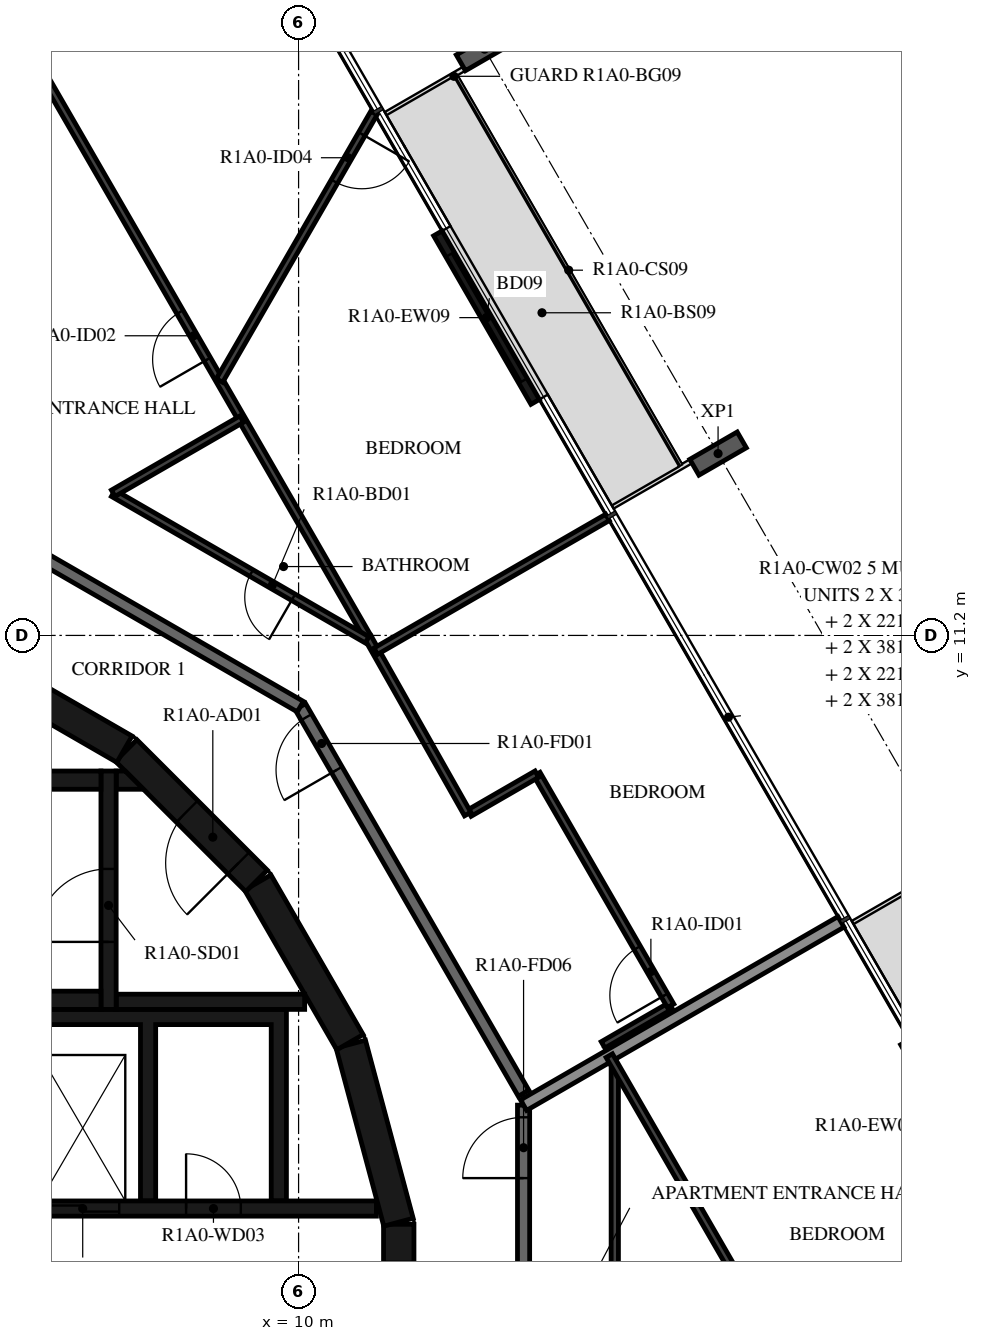
"""IFC4 building model, lengths in metres.
Left out: names, types, materials, properties, quantities, classifications, styles, units other than length and angle.
Written with IfcOpenShell. Run it as: python <this file> out.ifc"""

import sys

from ifc_helpers import new_model, si_unit, direction, frame, frame_2d, origin, origin_2d, place, context, subcontext, project, spatial, polyline, rectangle, i_section, outline, extrude, element, fill, save


model = new_model("IFC4")
c1 = context("Model", 3, precision=1e-05, world=origin(), true_north=direction((0.0, 1.0)))
c2 = subcontext(c1, "Body", "Model", "MODEL_VIEW")
j1 = project(units=[si_unit("LENGTHUNIT", "METRE"), si_unit("PLANEANGLEUNIT", "RADIAN")], contexts=[c1])
p1 = place(None, origin())
s1 = spatial("IfcSite", under=j1, at=p1, CompositionType="ELEMENT")
p2 = place(p1, origin())
s2 = spatial("IfcBuilding", under=s1, at=p2, CompositionType="ELEMENT")
p3 = place(p2, frame((0.0, 0.0, 45.4)))
s3 = spatial("IfcBuildingStorey", under=s2, at=p3, CompositionType="ELEMENT", Elevation=45.4)
for number, where, z_axis, x_axis in (
    (1, (16.899, 14.19, -0.38), (0.0, 0.0, 1.0), (0.5, -0.866, 0.0)),
    (2, (13.059, 20.842, -0.38), (0.0, 0.0, 1.0), (0.5, -0.866, 0.0)),
):
    element("IfcColumn", number, at=place(p3, frame(where, z_axis=z_axis, x_axis=x_axis)), inside=s3, PredefinedType="COLUMN", context=c2, shape_type="SweptSolid", body=[
        extrude(i_section(OverallWidth=0.3, OverallDepth=0.9, WebThickness=0.019, FlangeThickness=0.035, FilletRadius=0.03, at=origin_2d()), origin(), (0.0, 0.0, 1.0), 3.5),
    ])
p4 = place(p3, frame((21.571, 1.738, 0.0), z_axis=(0.0, 0.0, 1.0), x_axis=(-0.500028443584, 0.866008981251, 0.0)))
e3 = element("IfcWall", 3, at=p4, inside=s3, PredefinedType="STANDARD", context=c2, shape_type="SweptSolid", body=[
    extrude(rectangle(XDim=3.2, YDim=0.16, at=frame_2d((1.6, 0.0))), origin(), (0.0, 0.0, 1.0), 3.12),
])
p5 = place(p4, frame((0.4, 0.0, 0.0)))
e4 = element("IfcOpeningElement", 4, at=p5, cuts=e3, PredefinedType="OPENING", context=c2, shape_type="SweptSolid", body=[
    extrude(rectangle(XDim=2.4, YDim=2.4, at=frame_2d((1.2, 1.2))), frame((0.0, 0.09, 0.0), z_axis=(0.0, -1.0, 0.0), x_axis=(1.0, 0.0, 0.0)), (0.0, 0.0, 1.0), 0.18),
])
p6 = place(p3, frame((13.891, 15.041, 0.0), z_axis=(0.0, 0.0, 1.0), x_axis=(-0.499971222258, 0.866042017984, 0.0)))
e5 = element("IfcWall", 5, at=p6, inside=s3, PredefinedType="STANDARD", context=c2, shape_type="SweptSolid", body=[
    extrude(rectangle(XDim=3.2, YDim=0.16, at=frame_2d((1.6, 0.0))), origin(), (0.0, 0.0, 1.0), 3.12),
])
p7 = place(p6, frame((0.4, 0.0, 0.0)))
e6 = element("IfcOpeningElement", 6, at=p7, cuts=e5, PredefinedType="OPENING", context=c2, shape_type="SweptSolid", body=[
    extrude(rectangle(XDim=2.4, YDim=2.4, at=frame_2d((1.2, 1.2))), frame((0.0, 0.09, 0.0), z_axis=(0.0, -1.0, 0.0), x_axis=(1.0, 0.0, 0.0)), (0.0, 0.0, 1.0), 0.18),
])
p8 = place(p3, frame((11.647, -1.516, 0.0), z_axis=(0.0, 0.0, 1.0), x_axis=(0.0, 1.0, 0.0)))
e7 = element("IfcWall", 7, at=p8, inside=s3, PredefinedType="SHEAR", context=c2, shape_type="SweptSolid", body=[
    extrude(rectangle(XDim=3.033, YDim=0.5, at=frame_2d((1.516, 0.0))), origin(), (0.0, 0.0, 1.0), 3.12),
])
p9 = place(p8, frame((0.616, 0.0, 0.0)))
e8 = element("IfcOpeningElement", 8, at=p9, cuts=e7, PredefinedType="OPENING", context=c2, shape_type="SweptSolid", body=[
    extrude(rectangle(XDim=1.8, YDim=2.1, at=frame_2d((0.9, 1.05))), frame((0.0, 0.26, 0.0), z_axis=(0.0, -1.0, 0.0), x_axis=(1.0, 0.0, 0.0)), (0.0, 0.0, 1.0), 0.52),
])
for number, where, z_axis, x_axis in (
    (9, (11.643, 1.55, 0.0), (0.0, 0.0, 1.0), (-0.259, 0.966, 0.0)),
    (10, (10.845, 4.51, 0.0), (0.0, 0.0, 1.0), (-0.5, 0.866, 0.0)),
):
    element("IfcWall", number, at=place(p3, frame(where, z_axis=z_axis, x_axis=x_axis)), inside=s3, PredefinedType="SHEAR", context=c2, shape_type="SweptSolid", body=[
        extrude(rectangle(XDim=3.033, YDim=0.5, at=frame_2d((1.516, 0.0))), origin(), (0.0, 0.0, 1.0), 3.12),
    ])
p10 = place(p3, frame((9.308, 7.164, 0.0), z_axis=(0.0, 0.0, 1.0), x_axis=(-0.707106781187, 0.707106781187, 0.0)))
e11 = element("IfcWall", 11, at=p10, inside=s3, PredefinedType="SHEAR", context=c2, shape_type="SweptSolid", body=[
    extrude(rectangle(XDim=3.032, YDim=0.5, at=frame_2d((1.516, 0.0))), origin(), (0.0, 0.0, 1.0), 3.12),
])
p11 = place(p10, frame((0.416, 0.0, 0.0)))
e12 = element("IfcOpeningElement", 12, at=p11, cuts=e11, PredefinedType="OPENING", context=c2, shape_type="SweptSolid", body=[
    extrude(rectangle(XDim=1.2, YDim=2.1, at=frame_2d((0.6, 1.05))), frame((0.0, 0.26, 0.0), z_axis=(0.0, -1.0, 0.0), x_axis=(1.0, 0.0, 0.0)), (0.0, 0.0, 1.0), 0.52),
])
p12 = place(p3, frame((7.137, 9.329, 0.0), z_axis=(0.0, 0.0, 1.0), x_axis=(-0.865975092491, 0.500087131594, 0.0)))
e13 = element("IfcWall", 13, at=p12, inside=s3, PredefinedType="SHEAR", context=c2, shape_type="SweptSolid", body=[
    extrude(rectangle(XDim=3.033, YDim=0.5, at=frame_2d((1.516, 0.0))), origin(), (0.0, 0.0, 1.0), 3.12),
])
for number, where, z_axis, x_axis in (
    (14, (0.0, 5.2, 0.0), (0.0, 0.0, 1.0), (1.0, 0.0, 0.0)),
    (15, (0.0, 8.82, 0.0), (0.0, 0.0, 1.0), (1.0, 0.0, 0.0)),
):
    element("IfcWall", number, at=place(p3, frame(where, z_axis=z_axis, x_axis=x_axis)), inside=s3, PredefinedType="SHEAR", context=c2, shape_type="SweptSolid", body=[
        extrude(rectangle(XDim=6.75, YDim=0.3, at=frame_2d((3.375, 0.0))), origin(), (0.0, 0.0, 1.0), 3.12),
    ])
p13 = place(p3, frame((6.875, 5.05, 0.0), z_axis=(0.0, 0.0, 1.0), x_axis=(0.0, 1.0, 0.0)))
e16 = element("IfcWall", 16, at=p13, inside=s3, PredefinedType="SHEAR", context=c2, shape_type="SweptSolid", body=[
    extrude(rectangle(XDim=3.92, YDim=0.25, at=frame_2d((1.96, 0.0))), origin(), (0.0, 0.0, 1.0), 3.12),
])
p14 = place(p13, frame((1.11, 0.0, 0.0)))
e17 = element("IfcOpeningElement", 17, at=p14, cuts=e16, PredefinedType="OPENING", context=c2, shape_type="SweptSolid", body=[
    extrude(rectangle(XDim=1.2, YDim=2.1, at=frame_2d((0.6, 1.05))), frame((0.0, 0.135, 0.0), z_axis=(0.0, -1.0, 0.0), x_axis=(1.0, 0.0, 0.0)), (0.0, 0.0, 1.0), 0.27),
])
p15 = place(p3, frame((7.0, 5.175, 0.0), z_axis=(0.0, 0.0, 1.0), x_axis=(1.0, 0.0, 0.0)))
e18 = element("IfcWall", 18, at=p15, inside=s3, PredefinedType="SHEAR", context=c2, shape_type="SweptSolid", body=[
    extrude(rectangle(XDim=3.1, YDim=0.25, at=frame_2d((1.55, 0.0))), origin(), (0.0, 0.0, 1.0), 3.12),
])
p16 = place(p3, origin())
e19 = element("IfcWall", 19, at=p16, inside=s3, PredefinedType="SHEAR", context=c2, shape_type="SweptSolid", body=[
    extrude(outline(polyline([(7.448, 8.67), (7.0, 8.67), (7.0, 8.97), (7.148, 8.97), (7.448, 8.67)])), origin(), (0.0, 0.0, 1.0), 3.12),
])
p17 = place(p3, origin())
e20 = element("IfcWall", 20, at=p17, inside=s3, PredefinedType="SHEAR", context=c2, shape_type="SweptSolid", body=[
    extrude(outline(polyline([(-9.55, 4.8), (-7.65, 4.8), (-7.65, 1.9), (-7.4, 1.9), (-7.4, 4.8), (-5.5, 4.8), (-5.5, 1.9), (-5.25, 1.9), (-5.25, 4.8), (-3.35, 4.8), (-3.35, 1.9), (-3.1, 1.9), (-3.1, 4.8), (-1.2, 4.8), (-1.2, 1.9), (-0.95, 1.9), (-0.95, 4.8), (0.95, 4.8), (0.95, 1.9), (1.2, 1.9), (1.2, 4.8), (3.1, 4.8), (3.1, 1.9), (3.35, 1.9), (3.35, 4.8), (5.25, 4.8), (5.25, 1.9), (5.5, 1.9), (5.5, 4.8), (7.4, 4.8), (7.4, 1.9), (7.65, 1.9), (7.65, 4.8), (9.55, 4.8), (9.55, 1.9), (9.8, 1.9), (9.8, 4.8), (9.8, 5.05), (-9.8, 5.05), (-9.8, 4.8), (-9.8, 1.9), (-9.55, 1.9), (-9.55, 4.8)])), origin(), (0.0, 0.0, 1.0), 3.12),
])
p18 = place(p3, frame((3.35, 1.775, 0.0), z_axis=(0.0, 0.0, 1.0), x_axis=(1.0, 0.0, 0.0)))
e21 = element("IfcWall", 21, at=p18, inside=s3, PredefinedType="SHEAR", context=c2, shape_type="SweptSolid", body=[
    extrude(rectangle(XDim=7.93, YDim=0.25, at=frame_2d((3.965, 0.0))), origin(), (0.0, 0.0, 1.0), 3.12),
])
p19 = place(p18, frame((0.35, 0.0, 0.0)))
e22 = element("IfcOpeningElement", 22, at=p19, cuts=e21, PredefinedType="OPENING", context=c2, shape_type="SweptSolid", body=[
    extrude(rectangle(XDim=1.2, YDim=2.4, at=frame_2d((0.6, 1.2))), frame((0.0, 0.135, 0.0), z_axis=(0.0, -1.0, 0.0), x_axis=(1.0, 0.0, 0.0)), (0.0, 0.0, 1.0), 0.27),
])
p20 = place(p18, frame((2.5, 0.0, 0.0)))
e23 = element("IfcOpeningElement", 23, at=p20, cuts=e21, PredefinedType="OPENING", context=c2, shape_type="SweptSolid", body=[
    extrude(rectangle(XDim=1.2, YDim=2.4, at=frame_2d((0.6, 1.2))), frame((0.0, 0.135, 0.0), z_axis=(0.0, -1.0, 0.0), x_axis=(1.0, 0.0, 0.0)), (0.0, 0.0, 1.0), 0.27),
])
p21 = place(p18, frame((4.8, 0.0, 0.0)))
e24 = element("IfcOpeningElement", 24, at=p21, cuts=e21, PredefinedType="OPENING", context=c2, shape_type="SweptSolid", body=[
    extrude(rectangle(XDim=0.9, YDim=2.1, at=frame_2d((0.45, 1.05))), frame((0.0, 0.135, 0.0), z_axis=(0.0, -1.0, 0.0), x_axis=(1.0, 0.0, 0.0)), (0.0, 0.0, 1.0), 0.27),
])
p22 = place(p3, frame((13.7, 3.671, 0.0), z_axis=(0.0, 0.0, 1.0), x_axis=(-0.500001669485, 0.866024439905, 0.0)))
e25 = element("IfcWall", 25, at=p22, inside=s3, PredefinedType="STANDARD", context=c2, shape_type="SweptSolid", body=[
    extrude(rectangle(XDim=7.342, YDim=0.2, at=frame_2d((3.671, 0.0))), origin(), (0.0, 0.0, 1.0), 3.12),
])
p23 = place(p22, frame((6.142, 0.0, 0.0)))
e26 = element("IfcOpeningElement", 26, at=p23, cuts=e25, PredefinedType="OPENING", context=c2, shape_type="SweptSolid", body=[
    extrude(rectangle(XDim=1.0, YDim=2.1, at=frame_2d((0.5, 1.05))), frame((0.0, 0.11, 0.0), z_axis=(0.0, -1.0, 0.0), x_axis=(1.0, 0.0, 0.0)), (0.0, 0.0, 1.0), 0.22),
])
p24 = place(p3, frame((10.029, 10.029, 0.0), z_axis=(0.0, 0.0, 1.0), x_axis=(-0.866024439905, 0.500001669485, 0.0)))
e27 = element("IfcWall", 27, at=p24, inside=s3, PredefinedType="STANDARD", context=c2, shape_type="SweptSolid", body=[
    extrude(rectangle(XDim=7.342, YDim=0.2, at=frame_2d((3.671, 0.0))), origin(), (0.0, 0.0, 1.0), 3.12),
])
p25 = place(p3, frame((13.7, -3.671, 0.0), z_axis=(0.0, 0.0, 1.0), x_axis=(0.0, 1.0, 0.0)))
e28 = element("IfcWall", 28, at=p25, inside=s3, PredefinedType="STANDARD", context=c2, shape_type="SweptSolid", body=[
    extrude(rectangle(XDim=7.146, YDim=0.2, at=frame_2d((3.573, 0.0))), origin(), (0.0, 0.0, 1.0), 3.12),
])
p26 = place(p25, frame((5.947, 0.0, 0.0)))
e29 = element("IfcOpeningElement", 29, at=p26, cuts=e28, PredefinedType="OPENING", context=c2, shape_type="SweptSolid", body=[
    extrude(rectangle(XDim=1.0, YDim=2.1, at=frame_2d((0.5, 1.05))), frame((0.0, 0.11, 0.0), z_axis=(0.0, -1.0, 0.0), x_axis=(1.0, 0.0, 0.0)), (0.0, 0.0, 1.0), 0.22),
])
p27 = place(p3, frame((13.7, 3.476, 0.0), z_axis=(0.0, 0.0, 1.0), x_axis=(0.866013584312, 0.500020471368, 0.0)))
e30 = element("IfcWall", 30, at=p27, inside=s3, PredefinedType="STANDARD", context=c2, shape_type="SweptSolid", body=[
    extrude(rectangle(XDim=6.028, YDim=0.2, at=frame_2d((3.014, 0.0))), origin(), (0.0, 0.0, 1.0), 2.73),
])
p28 = place(p3, frame((15.007, 4.467, 0.0), z_axis=(0.0, 0.0, 1.0), x_axis=(0.86599869919, 0.500046250861, 0.0)))
e31 = element("IfcWall", 31, at=p28, inside=s3, PredefinedType="PARTITIONING", context=c2, shape_type="SweptSolid", body=[
    extrude(rectangle(XDim=1.284, YDim=0.12, at=frame_2d((0.642, 0.0))), origin(), (0.0, 0.0, 1.0), 3.12),
])
p29 = place(p3, frame((16.119, 5.109, 0.0), z_axis=(0.0, 0.0, 1.0), x_axis=(-0.499988222896, 0.866032203192, 0.0)))
e32 = element("IfcWall", 32, at=p29, inside=s3, PredefinedType="PARTITIONING", context=c2, shape_type="SweptSolid", body=[
    extrude(rectangle(XDim=4.4, YDim=0.12, at=frame_2d((2.2, 0.0))), origin(), (0.0, 0.0, 1.0), 3.12),
])
p30 = place(p29, frame((0.2, 0.0, 0.0)))
e33 = element("IfcOpeningElement", 33, at=p30, cuts=e32, PredefinedType="OPENING", context=c2, shape_type="SweptSolid", body=[
    extrude(rectangle(XDim=0.9, YDim=2.1, at=frame_2d((0.45, 1.05))), frame((0.0, 0.07, 0.0), z_axis=(0.0, -1.0, 0.0), x_axis=(1.0, 0.0, 0.0)), (0.0, 0.0, 1.0), 0.14),
])
p31 = place(p3, frame((13.919, 8.919, 0.0), z_axis=(0.0, 0.0, 1.0), x_axis=(-0.86599869919, -0.500046250861, 0.0)))
e34 = element("IfcWall", 34, at=p31, inside=s3, PredefinedType="PARTITIONING", context=c2, shape_type="SweptSolid", body=[
    extrude(rectangle(XDim=1.284, YDim=0.12, at=frame_2d((0.642, 0.0))), origin(), (0.0, 0.0, 1.0), 3.12),
])
p32 = place(p3, frame((12.781, 8.262, 0.0), z_axis=(0.0, 0.0, 1.0), x_axis=(-0.492233259633, 0.870463335305, 0.0)))
e35 = element("IfcWall", 35, at=p32, inside=s3, PredefinedType="PARTITIONING", context=c2, shape_type="SweptSolid", body=[
    extrude(rectangle(XDim=3.336, YDim=0.12, at=frame_2d((1.668, 0.0))), origin(), (0.0, 0.0, 1.0), 3.12),
])
p33 = place(p3, frame((11.139, 11.167, 0.0), z_axis=(0.0, 0.0, 1.0), x_axis=(-0.499994660107, 0.866028486751, 0.0)))
e36 = element("IfcWall", 36, at=p33, inside=s3, PredefinedType="PARTITIONING", context=c2, shape_type="SweptSolid", body=[
    extrude(rectangle(XDim=15.786, YDim=0.12, at=frame_2d((7.893, 0.0))), origin(), (0.0, 0.0, 1.0), 3.12),
])
p34 = place(p33, frame((5.279, 0.0, 0.0)))
e37 = element("IfcOpeningElement", 37, at=p34, cuts=e36, PredefinedType="OPENING", context=c2, shape_type="SweptSolid", body=[
    extrude(rectangle(XDim=0.9, YDim=2.1, at=frame_2d((0.45, 1.05))), frame((0.0, 0.07, 0.0), z_axis=(0.0, -1.0, 0.0), x_axis=(1.0, 0.0, 0.0)), (0.0, 0.0, 1.0), 0.14),
])
p35 = place(p33, frame((12.23, 0.0, 0.0)))
e38 = element("IfcOpeningElement", 38, at=p35, cuts=e36, PredefinedType="OPENING", context=c2, shape_type="SweptSolid", body=[
    extrude(rectangle(XDim=0.9, YDim=2.1, at=frame_2d((0.45, 1.05))), frame((0.0, 0.07, 0.0), z_axis=(0.0, -1.0, 0.0), x_axis=(1.0, 0.0, 0.0)), (0.0, 0.0, 1.0), 0.14),
])
p36 = place(p3, frame((11.127, 11.127, 0.0), z_axis=(0.0, 0.0, 1.0), x_axis=(-0.866043916853, 0.499967933054, 0.0)))
e39 = element("IfcWall", 39, at=p36, inside=s3, PredefinedType="PARTITIONING", context=c2, shape_type="SweptSolid", body=[
    extrude(rectangle(XDim=4.821, YDim=0.12, at=frame_2d((2.411, 0.0))), origin(), (0.0, 0.0, 1.0), 3.12),
])
p37 = place(p36, frame((1.4, 0.0, 0.0)))
e40 = element("IfcOpeningElement", 40, at=p37, cuts=e39, PredefinedType="OPENING", context=c2, shape_type="SweptSolid", body=[
    extrude(rectangle(XDim=0.8, YDim=2.1, at=frame_2d((0.4, 1.05))), frame((0.0, 0.07, 0.0), z_axis=(0.0, -1.0, 0.0), x_axis=(1.0, 0.0, 0.0)), (0.0, 0.0, 1.0), 0.14),
])
p38 = place(p3, frame((6.952, 13.538, 0.0), z_axis=(0.0, 0.0, 1.0), x_axis=(0.866030657337, 0.49999090047, 0.0)))
e41 = element("IfcWall", 41, at=p38, inside=s3, PredefinedType="PARTITIONING", context=c2, shape_type="SweptSolid", body=[
    extrude(rectangle(XDim=2.44, YDim=0.12, at=frame_2d((1.22, 0.0))), origin(), (0.0, 0.0, 1.0), 3.12),
])
p39 = place(p3, frame((15.08, 13.14, 0.0), z_axis=(0.0, 0.0, 1.0), x_axis=(-0.866032203192, -0.499988222896, 0.0)))
e42 = element("IfcWall", 42, at=p39, inside=s3, PredefinedType="PARTITIONING", context=c2, shape_type="SweptSolid", body=[
    extrude(rectangle(XDim=4.4, YDim=0.12, at=frame_2d((2.2, 0.0))), origin(), (0.0, 0.0, 1.0), 2.73),
])
p40 = place(p3, frame((11.24, 19.792, 0.0), z_axis=(0.0, 0.0, 1.0), x_axis=(-0.499978956711, -0.866037552792, 0.0)))
e43 = element("IfcWall", 43, at=p40, inside=s3, PredefinedType="PARTITIONING", context=c2, shape_type="SweptSolid", body=[
    extrude(rectangle(XDim=5.081, YDim=0.12, at=frame_2d((2.541, 0.0))), origin(), (0.0, 0.0, 1.0), 3.12),
])
p41 = place(p40, frame((0.4, 0.0, 0.0)))
e44 = element("IfcOpeningElement", 44, at=p41, cuts=e43, PredefinedType="OPENING", context=c2, shape_type="SweptSolid", body=[
    extrude(rectangle(XDim=0.9, YDim=2.1, at=frame_2d((0.45, 1.05))), frame((0.0, 0.07, 0.0), z_axis=(0.0, -1.0, 0.0), x_axis=(1.0, 0.0, 0.0)), (0.0, 0.0, 1.0), 0.14),
])
p42 = place(p3, frame((15.2, -4.073, 0.0), z_axis=(0.0, 0.0, 1.0), x_axis=(0.0, 1.0, 0.0)))
e45 = element("IfcWall", 45, at=p42, inside=s3, PredefinedType="PARTITIONING", context=c2, shape_type="SweptSolid", body=[
    extrude(rectangle(XDim=8.146, YDim=0.12, at=frame_2d((4.073, 0.0))), origin(), (0.0, 0.0, 1.0), 3.12),
])
p43 = place(p42, frame((1.357, 0.0, 0.0)))
e46 = element("IfcOpeningElement", 46, at=p43, cuts=e45, PredefinedType="OPENING", context=c2, shape_type="SweptSolid", body=[
    extrude(rectangle(XDim=0.8, YDim=2.1, at=frame_2d((0.4, 1.05))), frame((0.0, 0.07, 0.0), z_axis=(0.0, -1.0, 0.0), x_axis=(1.0, 0.0, 0.0)), (0.0, 0.0, 1.0), 0.14),
])
p44 = place(p3, frame((15.11, 4.289, 0.0), z_axis=(0.0, 0.0, 1.0), x_axis=(0.500001702147, -0.866024421047, 0.0)))
e47 = element("IfcWall", 47, at=p44, inside=s3, PredefinedType="PARTITIONING", context=c2, shape_type="SweptSolid", body=[
    extrude(rectangle(XDim=6.458, YDim=0.12, at=frame_2d((3.229, 0.0))), origin(), (0.0, 0.0, 1.0), 3.12),
])
p45 = place(p7, origin())
e48 = element("IfcDoor", 48, at=p45, inside=s3, OperationType="DOUBLE_DOOR_SLIDING", PredefinedType="DOOR", context=c2, shape_type="SweptSolid", body=[
    extrude(rectangle(XDim=2.4, YDim=2.4, at=frame_2d((1.2, 1.2))), frame((0.0, 0.025, 0.0), z_axis=(0.0, -1.0, 0.0), x_axis=(1.0, 0.0, 0.0)), (0.0, 0.0, 1.0), 0.05),
])
fill(e6, e48)
p46 = place(p14, origin())
e49 = element("IfcDoor", 49, at=p46, inside=s3, OperationType="SINGLE_SWING_LEFT", PredefinedType="DOOR", context=c2, shape_type="SweptSolid", body=[
    extrude(rectangle(XDim=1.2, YDim=2.1, at=frame_2d((0.6, 1.05))), frame((0.0, 0.025, 0.0), z_axis=(0.0, -1.0, 0.0), x_axis=(1.0, 0.0, 0.0)), (0.0, 0.0, 1.0), 0.05),
])
fill(e17, e49)
p47 = place(p11, origin())
e50 = element("IfcDoor", 50, at=p47, inside=s3, OperationType="SINGLE_SWING_RIGHT", PredefinedType="DOOR", context=c2, shape_type="SweptSolid", body=[
    extrude(rectangle(XDim=1.2, YDim=2.1, at=frame_2d((0.6, 1.05))), frame((0.0, 0.025, 0.0), z_axis=(0.0, -1.0, 0.0), x_axis=(1.0, 0.0, 0.0)), (0.0, 0.0, 1.0), 0.05),
])
fill(e12, e50)
p48 = place(p20, origin())
e51 = element("IfcDoor", 51, at=p48, inside=s3, OperationType="DOUBLE_DOOR_SLIDING", PredefinedType="DOOR", context=c2, shape_type="SweptSolid", body=[
    extrude(rectangle(XDim=1.2, YDim=2.4, at=frame_2d((0.6, 1.2))), frame((0.0, 0.025, 0.0), z_axis=(0.0, -1.0, 0.0), x_axis=(1.0, 0.0, 0.0)), (0.0, 0.0, 1.0), 0.05),
])
fill(e23, e51)
p49 = place(p21, origin())
e52 = element("IfcDoor", 52, at=p49, inside=s3, OperationType="SINGLE_SWING_RIGHT", PredefinedType="DOOR", context=c2, shape_type="SweptSolid", body=[
    extrude(rectangle(XDim=0.9, YDim=2.1, at=frame_2d((0.45, 1.05))), frame((0.0, 0.025, 0.0), z_axis=(0.0, -1.0, 0.0), x_axis=(1.0, 0.0, 0.0)), (0.0, 0.0, 1.0), 0.05),
])
fill(e24, e52)
p50 = place(p23, origin())
e53 = element("IfcDoor", 53, at=p50, inside=s3, OperationType="SINGLE_SWING_RIGHT", PredefinedType="DOOR", context=c2, shape_type="SweptSolid", body=[
    extrude(rectangle(XDim=1.0, YDim=2.1, at=frame_2d((0.5, 1.05))), frame((0.0, 0.025, 0.0), z_axis=(0.0, -1.0, 0.0), x_axis=(1.0, 0.0, 0.0)), (0.0, 0.0, 1.0), 0.05),
])
fill(e26, e53)
p51 = place(p30, origin())
e54 = element("IfcDoor", 54, at=p51, inside=s3, OperationType="SINGLE_SWING_LEFT", PredefinedType="DOOR", context=c2, shape_type="SweptSolid", body=[
    extrude(rectangle(XDim=0.9, YDim=2.1, at=frame_2d((0.45, 1.05))), frame((0.0, 0.025, 0.0), z_axis=(0.0, -1.0, 0.0), x_axis=(1.0, 0.0, 0.0)), (0.0, 0.0, 1.0), 0.05),
])
fill(e33, e54)
p52 = place(p37, origin())
e55 = element("IfcDoor", 55, at=p52, inside=s3, OperationType="SINGLE_SWING_RIGHT", PredefinedType="DOOR", context=c2, shape_type="SweptSolid", body=[
    extrude(rectangle(XDim=0.8, YDim=2.1, at=frame_2d((0.4, 1.05))), frame((0.0, 0.025, 0.0), z_axis=(0.0, -1.0, 0.0), x_axis=(1.0, 0.0, 0.0)), (0.0, 0.0, 1.0), 0.05),
])
fill(e40, e55)
p53 = place(p34, origin())
e56 = element("IfcDoor", 56, at=p53, inside=s3, OperationType="SINGLE_SWING_RIGHT", PredefinedType="DOOR", context=c2, shape_type="SweptSolid", body=[
    extrude(rectangle(XDim=0.9, YDim=2.1, at=frame_2d((0.45, 1.05))), frame((0.0, 0.025, 0.0), z_axis=(0.0, -1.0, 0.0), x_axis=(1.0, 0.0, 0.0)), (0.0, 0.0, 1.0), 0.05),
])
fill(e37, e56)
p54 = place(p41, origin())
e57 = element("IfcDoor", 57, at=p54, inside=s3, OperationType="SINGLE_SWING_LEFT", PredefinedType="DOOR", context=c2, shape_type="SweptSolid", body=[
    extrude(rectangle(XDim=0.9, YDim=2.1, at=frame_2d((0.45, 1.05))), frame((0.0, 0.025, 0.0), z_axis=(0.0, -1.0, 0.0), x_axis=(1.0, 0.0, 0.0)), (0.0, 0.0, 1.0), 0.05),
])
fill(e44, e57)
p55 = place(p26, origin())
e58 = element("IfcDoor", 58, at=p55, inside=s3, OperationType="SINGLE_SWING_LEFT", PredefinedType="DOOR", context=c2, shape_type="SweptSolid", body=[
    extrude(rectangle(XDim=1.0, YDim=2.1, at=frame_2d((0.5, 1.05))), frame((0.0, 0.025, 0.0), z_axis=(0.0, -1.0, 0.0), x_axis=(1.0, 0.0, 0.0)), (0.0, 0.0, 1.0), 0.05),
])
fill(e29, e58)
save(model, sys.argv[1])
